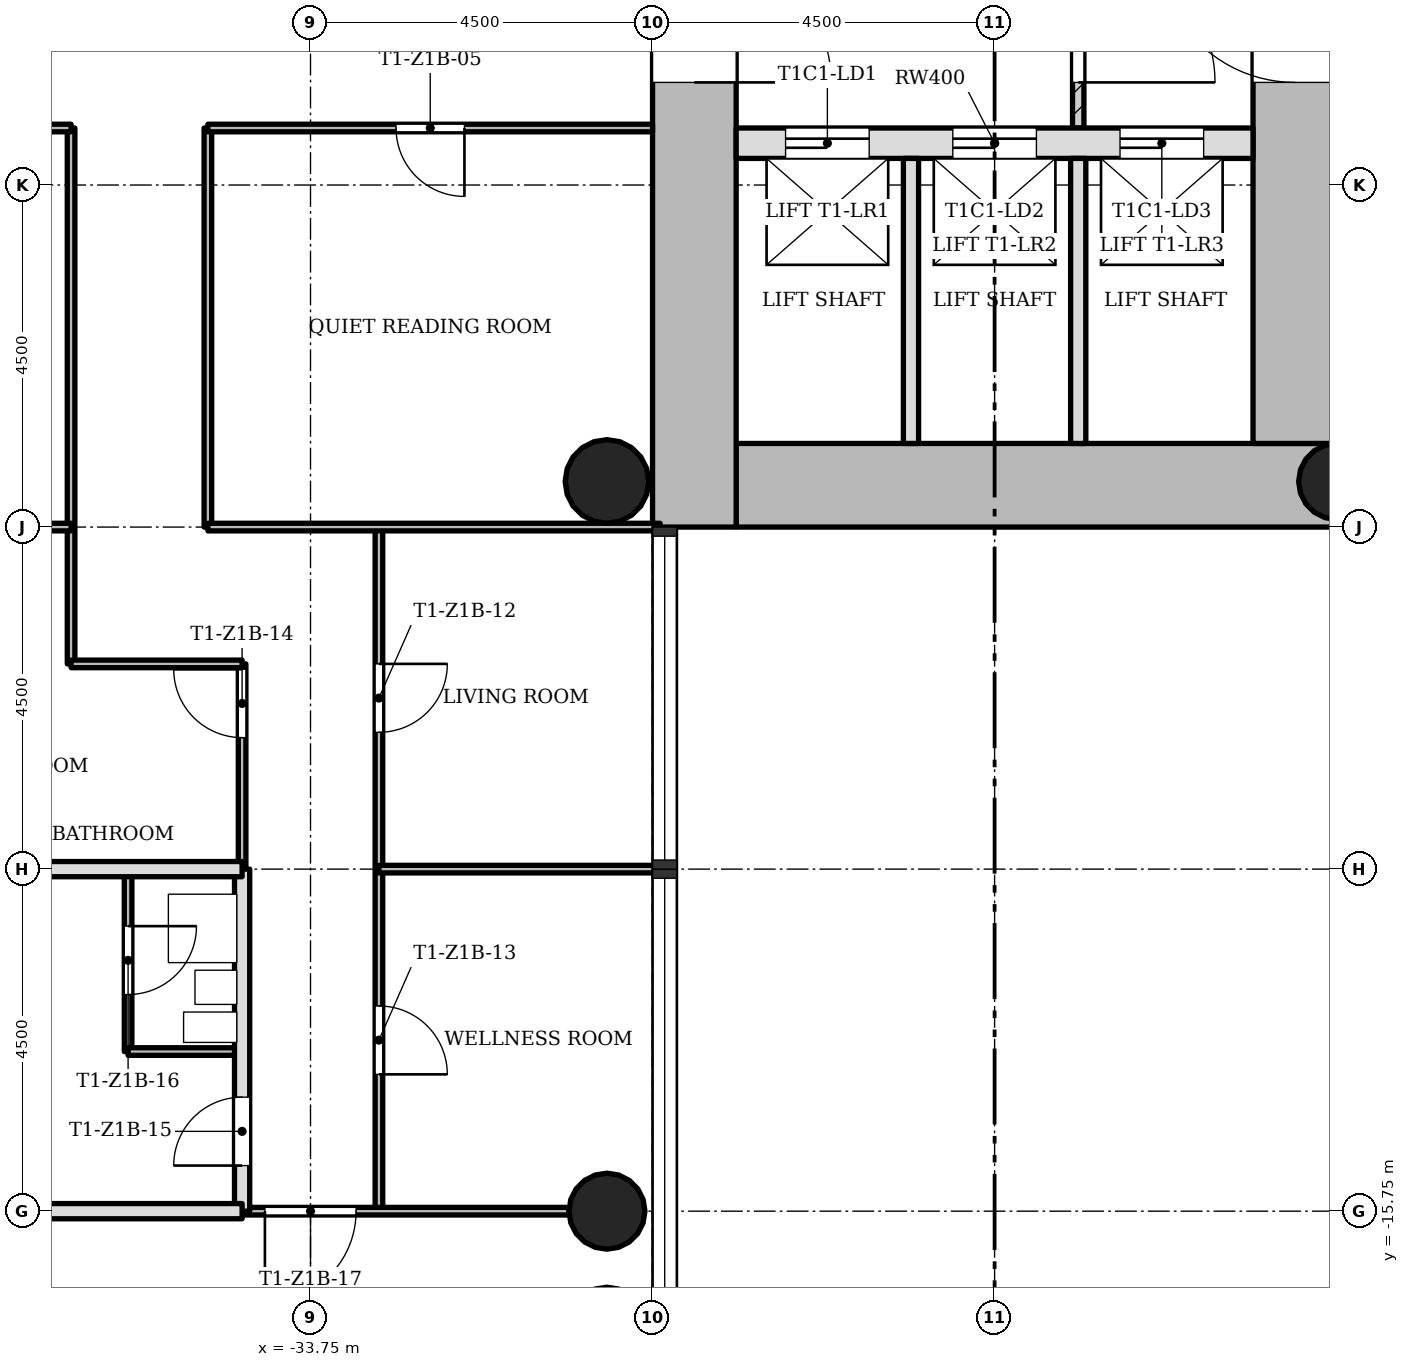
"""IFC4 building model, lengths in metres.
Left out: names, types, materials, properties, quantities, classifications, styles, units other than length and angle.
Written with IfcOpenShell. Run it as: python <this file> out.ifc"""

import sys

from ifc_helpers import new_model, si_unit, direction, frame, frame_2d, origin, origin_2d, place, context, subcontext, project, spatial, rectangle, hollow_circle, extrude, element, fill, save


model = new_model("IFC4")
c1 = context("Model", 3, precision=1e-05, world=origin(), true_north=direction((0.0, 1.0)))
c2 = subcontext(c1, "Body", "Model", "MODEL_VIEW")
j1 = project(units=[si_unit("LENGTHUNIT", "METRE"), si_unit("PLANEANGLEUNIT", "RADIAN")], contexts=[c1])
p1 = place(None, origin())
s1 = spatial("IfcSite", under=j1, at=p1, CompositionType="ELEMENT")
p2 = place(p1, origin())
s2 = spatial("IfcBuilding", under=s1, at=p2, CompositionType="ELEMENT")
p3 = place(p2, frame((0.0, 0.0, 41.5)))
s3 = spatial("IfcBuildingStorey", under=s2, at=p3, CompositionType="ELEMENT", Elevation=41.5)
p4 = place(p3, frame((-28.15, -6.2, 0.0), z_axis=(0.0, 0.0, 1.0), x_axis=(1.0, 0.0, 0.0)))
e1 = element("IfcWall", 1, at=p4, inside=s3, PredefinedType="SHEAR", context=c2, shape_type="SweptSolid", body=[
    extrude(rectangle(XDim=7.9, YDim=1.1, at=frame_2d((3.95, 0.0))), origin(), (0.0, 0.0, 1.0), 3.4),
])
p5 = place(p3, frame((-20.8, -5.65, 0.0), z_axis=(0.0, 0.0, 1.0), x_axis=(0.0, 1.0, 0.0)))
e2 = element("IfcWall", 2, at=p5, inside=s3, PredefinedType="SHEAR", context=c2, shape_type="SweptSolid", body=[
    extrude(rectangle(XDim=12.4, YDim=1.1, at=frame_2d((6.2, 0.0))), origin(), (0.0, 0.0, 1.0), 3.4),
])
p6 = place(p5, frame((4.75, 0.0, 0.0)))
e3 = element("IfcOpeningElement", 3, at=p6, cuts=e2, PredefinedType="OPENING", context=c2, shape_type="SweptSolid", body=[
    extrude(rectangle(XDim=1.8, YDim=2.1, at=frame_2d((0.9, 1.05))), frame((0.0, 0.56, 0.0), z_axis=(0.0, -1.0, 0.0), x_axis=(1.0, 0.0, 0.0)), (0.0, 0.0, 1.0), 1.12),
])
p7 = place(p3, frame((-28.7, 5.65, 0.0), z_axis=(0.0, 0.0, 1.0), x_axis=(0.0, -1.0, 0.0)))
e4 = element("IfcWall", 4, at=p7, inside=s3, PredefinedType="SHEAR", context=c2, shape_type="SweptSolid", body=[
    extrude(rectangle(XDim=12.4, YDim=1.1, at=frame_2d((6.2, 0.0))), origin(), (0.0, 0.0, 1.0), 3.4),
])
p8 = place(p7, frame((4.75, 0.0, 0.0)))
e5 = element("IfcOpeningElement", 5, at=p8, cuts=e4, PredefinedType="OPENING", context=c2, shape_type="SweptSolid", body=[
    extrude(rectangle(XDim=1.8, YDim=2.1, at=frame_2d((0.9, 1.05))), frame((0.0, 0.56, 0.0), z_axis=(0.0, -1.0, 0.0), x_axis=(1.0, 0.0, 0.0)), (0.0, 0.0, 1.0), 1.12),
])
p9 = place(p3, frame((-28.15, -1.7, 0.0), z_axis=(0.0, 0.0, 1.0), x_axis=(1.0, 0.0, 0.0)))
e6 = element("IfcWall", 6, at=p9, inside=s3, PredefinedType="SHEAR", context=c2, shape_type="SweptSolid", body=[
    extrude(rectangle(XDim=6.8, YDim=0.4, at=frame_2d((3.4, 0.0))), origin(), (0.0, 0.0, 1.0), 3.4),
])
p10 = place(p9, frame((0.65, 0.0, 0.0)))
e7 = element("IfcOpeningElement", 7, at=p10, cuts=e6, PredefinedType="OPENING", context=c2, shape_type="SweptSolid", body=[
    extrude(rectangle(XDim=1.1, YDim=2.1, at=frame_2d((0.55, 1.05))), frame((0.0, 0.21, 0.0), z_axis=(0.0, -1.0, 0.0), x_axis=(1.0, 0.0, 0.0)), (0.0, 0.0, 1.0), 0.42),
])
p11 = place(p9, frame((2.85, 0.0, 0.0)))
e8 = element("IfcOpeningElement", 8, at=p11, cuts=e6, PredefinedType="OPENING", context=c2, shape_type="SweptSolid", body=[
    extrude(rectangle(XDim=1.1, YDim=2.1, at=frame_2d((0.55, 1.05))), frame((0.0, 0.21, 0.0), z_axis=(0.0, -1.0, 0.0), x_axis=(1.0, 0.0, 0.0)), (0.0, 0.0, 1.0), 0.42),
])
p12 = place(p9, frame((5.05, 0.0, 0.0)))
e9 = element("IfcOpeningElement", 9, at=p12, cuts=e6, PredefinedType="OPENING", context=c2, shape_type="SweptSolid", body=[
    extrude(rectangle(XDim=1.1, YDim=2.1, at=frame_2d((0.55, 1.05))), frame((0.0, 0.21, 0.0), z_axis=(0.0, -1.0, 0.0), x_axis=(1.0, 0.0, 0.0)), (0.0, 0.0, 1.0), 0.42),
])
for number, where, z_axis, x_axis in (
    (10, (-20.25, -6.15, 0.0), (0.0, 0.0, 1.0), (1.0, 0.0, 0.0)),
    (11, (-29.85, -15.75, 0.0), (0.0, 0.0, 1.0), (1.0, 0.0, 0.0)),
):
    element("IfcColumn", number, at=place(p3, frame(where, z_axis=z_axis, x_axis=x_axis)), inside=s3, PredefinedType="COLUMN", context=c2, shape_type="SweptSolid", body=[
        extrude(hollow_circle(Radius=0.5, WallThickness=0.036, at=origin_2d()), origin(), (0.0, 0.0, 1.0), 3.4),
    ])
p13 = place(p3, frame((-29.85, -6.15, 0.0), z_axis=(0.0, 0.0, 1.0), x_axis=(1.0, 0.0, 0.0)))
e12 = element("IfcColumn", 12, at=p13, inside=s3, PredefinedType="COLUMN", context=c2, shape_type="SweptSolid", body=[
    extrude(hollow_circle(Radius=0.55, WallThickness=0.04, at=origin_2d()), origin(), (0.0, 0.0, 1.0), 3.4),
])
p14 = place(p3, frame((-23.65, -1.5, 0.0), z_axis=(0.0, 0.0, 1.0), x_axis=(0.0, 1.0, 0.0)))
e13 = element("IfcWall", 13, at=p14, inside=s3, PredefinedType="PARTITIONING", context=c2, shape_type="SweptSolid", body=[
    extrude(rectangle(XDim=3.0, YDim=0.15, at=frame_2d((1.5, 0.0))), origin(), (0.0, 0.0, 1.0), 3.0),
])
p15 = place(p14, frame((0.6, 0.0, 0.0)))
e14 = element("IfcOpeningElement", 14, at=p15, cuts=e13, PredefinedType="OPENING", context=c2, shape_type="SweptSolid", body=[
    extrude(rectangle(XDim=1.8, YDim=2.1, at=frame_2d((0.9, 1.05))), frame((0.0, 0.085, 0.0), z_axis=(0.0, -1.0, 0.0), x_axis=(1.0, 0.0, 0.0)), (0.0, 0.0, 1.0), 0.17),
])
for number, where, z_axis, x_axis in (
    (15, (-25.85, -5.65, 0.0), (0.0, 0.0, 1.0), (0.0, 1.0, 0.0)),
    (16, (-23.65, -5.65, 0.0), (0.0, 0.0, 1.0), (0.0, 1.0, 0.0)),
):
    element("IfcWall", number, at=place(p3, frame(where, z_axis=z_axis, x_axis=x_axis)), inside=s3, PredefinedType="SOLIDWALL", context=c2, shape_type="SweptSolid", body=[
        extrude(rectangle(XDim=3.75, YDim=0.2, at=frame_2d((1.875, 0.0))), origin(), (0.0, 0.0, 1.0), 3.0),
    ])
p16 = place(p3, frame((-36.9, -8.55, 0.0), z_axis=(0.0, 0.0, 1.0), x_axis=(0.0, 1.0, 0.0)))
e17 = element("IfcWall", 17, at=p16, inside=s3, PredefinedType="PARTITIONING", context=c2, shape_type="SweptSolid", body=[
    extrude(rectangle(XDim=7.05, YDim=0.1, at=frame_2d((3.525, 0.0))), origin(), (0.0, 0.0, 1.0), 3.0),
])
p17 = place(p3, frame((-36.15, -13.65, 0.0), z_axis=(0.0, 0.0, 1.0), x_axis=(0.0, 1.0, 0.0)))
e18 = element("IfcWall", 18, at=p17, inside=s3, PredefinedType="PARTITIONING", context=c2, shape_type="SweptSolid", body=[
    extrude(rectangle(XDim=2.4, YDim=0.1, at=frame_2d((1.2, 0.0))), origin(), (0.0, 0.0, 1.0), 3.0),
])
p18 = place(p17, frame((0.75, 0.0, 0.0)))
e19 = element("IfcOpeningElement", 19, at=p18, cuts=e18, PredefinedType="OPENING", context=c2, shape_type="SweptSolid", body=[
    extrude(rectangle(XDim=0.9, YDim=2.1, at=frame_2d((0.45, 1.05))), frame((0.0, 0.06, 0.0), z_axis=(0.0, -1.0, 0.0), x_axis=(1.0, 0.0, 0.0)), (0.0, 0.0, 1.0), 0.12),
])
p19 = place(p3, frame((-35.1, -6.75, 0.0), z_axis=(0.0, 0.0, 1.0), x_axis=(0.0, 1.0, 0.0)))
e20 = element("IfcWall", 20, at=p19, inside=s3, PredefinedType="PARTITIONING", context=c2, shape_type="SweptSolid", body=[
    extrude(rectangle(XDim=5.25, YDim=0.1, at=frame_2d((2.625, 0.0))), origin(), (0.0, 0.0, 1.0), 3.0),
])
p20 = place(p3, frame((-34.65, -11.25, 0.0), z_axis=(0.0, 0.0, 1.0), x_axis=(0.0, 1.0, 0.0)))
e21 = element("IfcWall", 21, at=p20, inside=s3, PredefinedType="PARTITIONING", context=c2, shape_type="SweptSolid", body=[
    extrude(rectangle(XDim=2.7, YDim=0.1, at=frame_2d((1.35, 0.0))), origin(), (0.0, 0.0, 1.0), 3.0),
])
p21 = place(p20, frame((1.73, 0.0, 0.0)))
e22 = element("IfcOpeningElement", 22, at=p21, cuts=e21, PredefinedType="OPENING", context=c2, shape_type="SweptSolid", body=[
    extrude(rectangle(XDim=0.9, YDim=2.1, at=frame_2d((0.45, 1.05))), frame((0.0, 0.06, 0.0), z_axis=(0.0, -1.0, 0.0), x_axis=(1.0, 0.0, 0.0)), (0.0, 0.0, 1.0), 0.12),
])
p22 = place(p3, frame((-34.65, -15.75, 0.0), z_axis=(0.0, 0.0, 1.0), x_axis=(0.0, 1.0, 0.0)))
e23 = element("IfcWall", 23, at=p22, inside=s3, PredefinedType="SOLIDWALL", context=c2, shape_type="SweptSolid", body=[
    extrude(rectangle(XDim=4.5, YDim=0.2, at=frame_2d((2.25, 0.0))), origin(), (0.0, 0.0, 1.0), 3.0),
])
p23 = place(p22, frame((0.6, 0.0, 0.0)))
e24 = element("IfcOpeningElement", 24, at=p23, cuts=e23, PredefinedType="OPENING", context=c2, shape_type="SweptSolid", body=[
    extrude(rectangle(XDim=0.9, YDim=2.1, at=frame_2d((0.45, 1.05))), frame((0.0, 0.11, 0.0), z_axis=(0.0, -1.0, 0.0), x_axis=(1.0, 0.0, 0.0)), (0.0, 0.0, 1.0), 0.22),
])
p24 = place(p3, frame((-32.85, -15.75, 0.0), z_axis=(0.0, 0.0, 1.0), x_axis=(0.0, 1.0, 0.0)))
e25 = element("IfcWall", 25, at=p24, inside=s3, PredefinedType="PARTITIONING", context=c2, shape_type="SweptSolid", body=[
    extrude(rectangle(XDim=9.0, YDim=0.1, at=frame_2d((4.5, 0.0))), origin(), (0.0, 0.0, 1.0), 3.0),
])
p25 = place(p24, frame((6.3, 0.0, 0.0)))
e26 = element("IfcOpeningElement", 26, at=p25, cuts=e25, PredefinedType="OPENING", context=c2, shape_type="SweptSolid", body=[
    extrude(rectangle(XDim=0.9, YDim=2.1, at=frame_2d((0.45, 1.05))), frame((0.0, 0.06, 0.0), z_axis=(0.0, -1.0, 0.0), x_axis=(1.0, 0.0, 0.0)), (0.0, 0.0, 1.0), 0.12),
])
p26 = place(p24, frame((1.8, 0.0, 0.0)))
e27 = element("IfcOpeningElement", 27, at=p26, cuts=e25, PredefinedType="OPENING", context=c2, shape_type="SweptSolid", body=[
    extrude(rectangle(XDim=0.9, YDim=2.1, at=frame_2d((0.45, 1.05))), frame((0.0, 0.06, 0.0), z_axis=(0.0, -1.0, 0.0), x_axis=(1.0, 0.0, 0.0)), (0.0, 0.0, 1.0), 0.12),
])
p27 = place(p3, frame((-34.65, -15.75, 0.0), z_axis=(0.0, 0.0, 1.0), x_axis=(1.0, 0.0, 0.0)))
e28 = element("IfcWall", 28, at=p27, inside=s3, PredefinedType="PARTITIONING", context=c2, shape_type="SweptSolid", body=[
    extrude(rectangle(XDim=4.3, YDim=0.1, at=frame_2d((2.15, 0.0))), origin(), (0.0, 0.0, 1.0), 3.0),
])
p28 = place(p27, frame((0.3, 0.0, 0.0)))
e29 = element("IfcOpeningElement", 29, at=p28, cuts=e28, PredefinedType="OPENING", context=c2, shape_type="SweptSolid", body=[
    extrude(rectangle(XDim=1.2, YDim=2.1, at=frame_2d((0.6, 1.05))), frame((0.0, 0.06, 0.0), z_axis=(0.0, -1.0, 0.0), x_axis=(1.0, 0.0, 0.0)), (0.0, 0.0, 1.0), 0.12),
])
p29 = place(p3, frame((-41.65, -15.75, 0.0), z_axis=(0.0, 0.0, 1.0), x_axis=(1.0, 0.0, 0.0)))
e30 = element("IfcWall", 30, at=p29, inside=s3, PredefinedType="SOLIDWALL", context=c2, shape_type="SweptSolid", body=[
    extrude(rectangle(XDim=7.0, YDim=0.2, at=frame_2d((3.5, 0.0))), origin(), (0.0, 0.0, 1.0), 3.0),
])
p30 = place(p3, frame((-36.15, -13.65, 0.0), z_axis=(0.0, 0.0, 1.0), x_axis=(1.0, 0.0, 0.0)))
e31 = element("IfcWall", 31, at=p30, inside=s3, PredefinedType="PARTITIONING", context=c2, shape_type="SweptSolid", body=[
    extrude(rectangle(XDim=1.5, YDim=0.1, at=frame_2d((0.75, 0.0))), origin(), (0.0, 0.0, 1.0), 3.0),
])
p31 = place(p3, frame((-32.85, -11.25, 0.0), z_axis=(0.0, 0.0, 1.0), x_axis=(1.0, 0.0, 0.0)))
e32 = element("IfcWall", 32, at=p31, inside=s3, PredefinedType="PARTITIONING", context=c2, shape_type="SweptSolid", body=[
    extrude(rectangle(XDim=3.7, YDim=0.1, at=frame_2d((1.85, 0.0))), origin(), (0.0, 0.0, 1.0), 3.0),
])
p32 = place(p3, frame((-42.85, -11.25, 0.0), z_axis=(0.0, 0.0, 1.0), x_axis=(1.0, 0.0, 0.0)))
e33 = element("IfcWall", 33, at=p32, inside=s3, PredefinedType="SOLIDWALL", context=c2, shape_type="SweptSolid", body=[
    extrude(rectangle(XDim=8.2, YDim=0.2, at=frame_2d((4.1, 0.0))), origin(), (0.0, 0.0, 1.0), 3.0),
])
p33 = place(p3, frame((-36.9, -8.55, 0.0), z_axis=(0.0, 0.0, 1.0), x_axis=(1.0, 0.0, 0.0)))
e34 = element("IfcWall", 34, at=p33, inside=s3, PredefinedType="PARTITIONING", context=c2, shape_type="SweptSolid", body=[
    extrude(rectangle(XDim=2.25, YDim=0.1, at=frame_2d((1.125, 0.0))), origin(), (0.0, 0.0, 1.0), 3.0),
])
for number, where, z_axis, x_axis in (
    (35, (-42.85, -6.75, 0.0), (0.0, 0.0, 1.0), (1.0, 0.0, 0.0)),
    (36, (-35.1, -6.75, 0.0), (0.0, 0.0, 1.0), (1.0, 0.0, 0.0)),
):
    element("IfcWall", number, at=place(p3, frame(where, z_axis=z_axis, x_axis=x_axis)), inside=s3, PredefinedType="PARTITIONING", context=c2, shape_type="SweptSolid", body=[
        extrude(rectangle(XDim=5.95, YDim=0.1, at=frame_2d((2.975, 0.0))), origin(), (0.0, 0.0, 1.0), 3.0),
    ])
p34 = place(p3, frame((-42.75, -1.5, 0.0), z_axis=(0.0, 0.0, 1.0), x_axis=(1.0, 0.0, 0.0)))
e37 = element("IfcWall", 37, at=p34, inside=s3, PredefinedType="PARTITIONING", context=c2, shape_type="SweptSolid", body=[
    extrude(rectangle(XDim=5.85, YDim=0.1, at=frame_2d((2.925, 0.0))), origin(), (0.0, 0.0, 1.0), 3.0),
])
p35 = place(p34, frame((2.475, 0.0, 0.0)))
e38 = element("IfcOpeningElement", 38, at=p35, cuts=e37, PredefinedType="OPENING", context=c2, shape_type="SweptSolid", body=[
    extrude(rectangle(XDim=0.9, YDim=2.1, at=frame_2d((0.45, 1.05))), frame((0.0, 0.06, 0.0), z_axis=(0.0, -1.0, 0.0), x_axis=(1.0, 0.0, 0.0)), (0.0, 0.0, 1.0), 0.12),
])
p36 = place(p3, frame((-35.1, -1.5, 0.0), z_axis=(0.0, 0.0, 1.0), x_axis=(1.0, 0.0, 0.0)))
e39 = element("IfcWall", 39, at=p36, inside=s3, PredefinedType="PARTITIONING", context=c2, shape_type="SweptSolid", body=[
    extrude(rectangle(XDim=5.85, YDim=0.1, at=frame_2d((2.925, 0.0))), origin(), (0.0, 0.0, 1.0), 3.0),
])
p37 = place(p36, frame((2.475, 0.0, 0.0)))
e40 = element("IfcOpeningElement", 40, at=p37, cuts=e39, PredefinedType="OPENING", context=c2, shape_type="SweptSolid", body=[
    extrude(rectangle(XDim=0.9, YDim=2.1, at=frame_2d((0.45, 1.05))), frame((0.0, 0.06, 0.0), z_axis=(0.0, -1.0, 0.0), x_axis=(1.0, 0.0, 0.0)), (0.0, 0.0, 1.0), 0.12),
])
p38 = place(p15, origin())
e41 = element("IfcDoor", 41, at=p38, inside=s3, OperationType="SINGLE_SWING_LEFT", PredefinedType="DOOR", context=c2, shape_type="SweptSolid", body=[
    extrude(rectangle(XDim=1.8, YDim=2.1, at=frame_2d((0.9, 1.05))), frame((0.0, 0.025, 0.0), z_axis=(0.0, -1.0, 0.0), x_axis=(1.0, 0.0, 0.0)), (0.0, 0.0, 1.0), 0.05),
])
fill(e14, e41)
p39 = place(p37, origin())
e42 = element("IfcDoor", 42, at=p39, inside=s3, OperationType="SINGLE_SWING_RIGHT", PredefinedType="DOOR", context=c2, shape_type="SweptSolid", body=[
    extrude(rectangle(XDim=0.9, YDim=2.1, at=frame_2d((0.45, 1.05))), frame((0.0, 0.025, 0.0), z_axis=(0.0, -1.0, 0.0), x_axis=(1.0, 0.0, 0.0)), (0.0, 0.0, 1.0), 0.05),
])
fill(e40, e42)
p40 = place(p25, origin())
e43 = element("IfcDoor", 43, at=p40, inside=s3, OperationType="SINGLE_SWING_RIGHT", PredefinedType="DOOR", context=c2, shape_type="SweptSolid", body=[
    extrude(rectangle(XDim=0.9, YDim=2.1, at=frame_2d((0.45, 1.05))), frame((0.0, 0.025, 0.0), z_axis=(0.0, -1.0, 0.0), x_axis=(1.0, 0.0, 0.0)), (0.0, 0.0, 1.0), 0.05),
])
fill(e26, e43)
p41 = place(p26, origin())
e44 = element("IfcDoor", 44, at=p41, inside=s3, OperationType="SINGLE_SWING_LEFT", PredefinedType="DOOR", context=c2, shape_type="SweptSolid", body=[
    extrude(rectangle(XDim=0.9, YDim=2.1, at=frame_2d((0.45, 1.05))), frame((0.0, 0.025, 0.0), z_axis=(0.0, -1.0, 0.0), x_axis=(1.0, 0.0, 0.0)), (0.0, 0.0, 1.0), 0.05),
])
fill(e27, e44)
p42 = place(p21, origin())
e45 = element("IfcDoor", 45, at=p42, inside=s3, OperationType="SINGLE_SWING_LEFT", PredefinedType="DOOR", context=c2, shape_type="SweptSolid", body=[
    extrude(rectangle(XDim=0.9, YDim=2.1, at=frame_2d((0.45, 1.05))), frame((0.0, 0.025, 0.0), z_axis=(0.0, -1.0, 0.0), x_axis=(1.0, 0.0, 0.0)), (0.0, 0.0, 1.0), 0.05),
])
fill(e22, e45)
p43 = place(p23, origin())
e46 = element("IfcDoor", 46, at=p43, inside=s3, OperationType="SINGLE_SWING_RIGHT", PredefinedType="DOOR", context=c2, shape_type="SweptSolid", body=[
    extrude(rectangle(XDim=0.9, YDim=2.1, at=frame_2d((0.45, 1.05))), frame((0.0, 0.025, 0.0), z_axis=(0.0, -1.0, 0.0), x_axis=(1.0, 0.0, 0.0)), (0.0, 0.0, 1.0), 0.05),
])
fill(e24, e46)
p44 = place(p18, origin())
e47 = element("IfcDoor", 47, at=p44, inside=s3, OperationType="SINGLE_SWING_RIGHT", PredefinedType="DOOR", context=c2, shape_type="SweptSolid", body=[
    extrude(rectangle(XDim=0.9, YDim=2.1, at=frame_2d((0.45, 1.05))), frame((0.0, 0.025, 0.0), z_axis=(0.0, -1.0, 0.0), x_axis=(1.0, 0.0, 0.0)), (0.0, 0.0, 1.0), 0.05),
])
fill(e19, e47)
p45 = place(p28, origin())
e48 = element("IfcDoor", 48, at=p45, inside=s3, OperationType="SINGLE_SWING_LEFT", PredefinedType="DOOR", context=c2, shape_type="SweptSolid", body=[
    extrude(rectangle(XDim=1.2, YDim=2.1, at=frame_2d((0.6, 1.05))), frame((0.0, 0.025, 0.0), z_axis=(0.0, -1.0, 0.0), x_axis=(1.0, 0.0, 0.0)), (0.0, 0.0, 1.0), 0.05),
])
fill(e29, e48)
p46 = place(p10, origin())
e49 = element("IfcDoor", 49, at=p46, inside=s3, OperationType="SLIDING_TO_LEFT", PredefinedType="DOOR", context=c2, shape_type="SweptSolid", body=[
    extrude(rectangle(XDim=1.1, YDim=2.1, at=frame_2d((0.55, 1.05))), frame((0.0, 0.025, 0.0), z_axis=(0.0, -1.0, 0.0), x_axis=(1.0, 0.0, 0.0)), (0.0, 0.0, 1.0), 0.05),
])
fill(e7, e49)
p47 = place(p11, origin())
e50 = element("IfcDoor", 50, at=p47, inside=s3, OperationType="SLIDING_TO_LEFT", PredefinedType="DOOR", context=c2, shape_type="SweptSolid", body=[
    extrude(rectangle(XDim=1.1, YDim=2.1, at=frame_2d((0.55, 1.05))), frame((0.0, 0.025, 0.0), z_axis=(0.0, -1.0, 0.0), x_axis=(1.0, 0.0, 0.0)), (0.0, 0.0, 1.0), 0.05),
])
fill(e8, e50)
p48 = place(p12, origin())
e51 = element("IfcDoor", 51, at=p48, inside=s3, OperationType="SLIDING_TO_LEFT", PredefinedType="DOOR", context=c2, shape_type="SweptSolid", body=[
    extrude(rectangle(XDim=1.1, YDim=2.1, at=frame_2d((0.55, 1.05))), frame((0.0, 0.025, 0.0), z_axis=(0.0, -1.0, 0.0), x_axis=(1.0, 0.0, 0.0)), (0.0, 0.0, 1.0), 0.05),
])
fill(e9, e51)
p49 = place(p8, origin())
e52 = element("IfcDoor", 52, at=p49, inside=s3, OperationType="SINGLE_SWING_LEFT", PredefinedType="DOOR", context=c2, shape_type="SweptSolid", body=[
    extrude(rectangle(XDim=1.8, YDim=2.1, at=frame_2d((0.9, 1.05))), frame((0.0, 0.025, 0.0), z_axis=(0.0, -1.0, 0.0), x_axis=(1.0, 0.0, 0.0)), (0.0, 0.0, 1.0), 0.05),
])
fill(e5, e52)
p50 = place(p6, origin())
e53 = element("IfcDoor", 53, at=p50, inside=s3, OperationType="SINGLE_SWING_LEFT", PredefinedType="DOOR", context=c2, shape_type="SweptSolid", body=[
    extrude(rectangle(XDim=1.8, YDim=2.1, at=frame_2d((0.9, 1.05))), frame((0.0, 0.025, 0.0), z_axis=(0.0, -1.0, 0.0), x_axis=(1.0, 0.0, 0.0)), (0.0, 0.0, 1.0), 0.05),
])
fill(e3, e53)
save(model, sys.argv[1])
